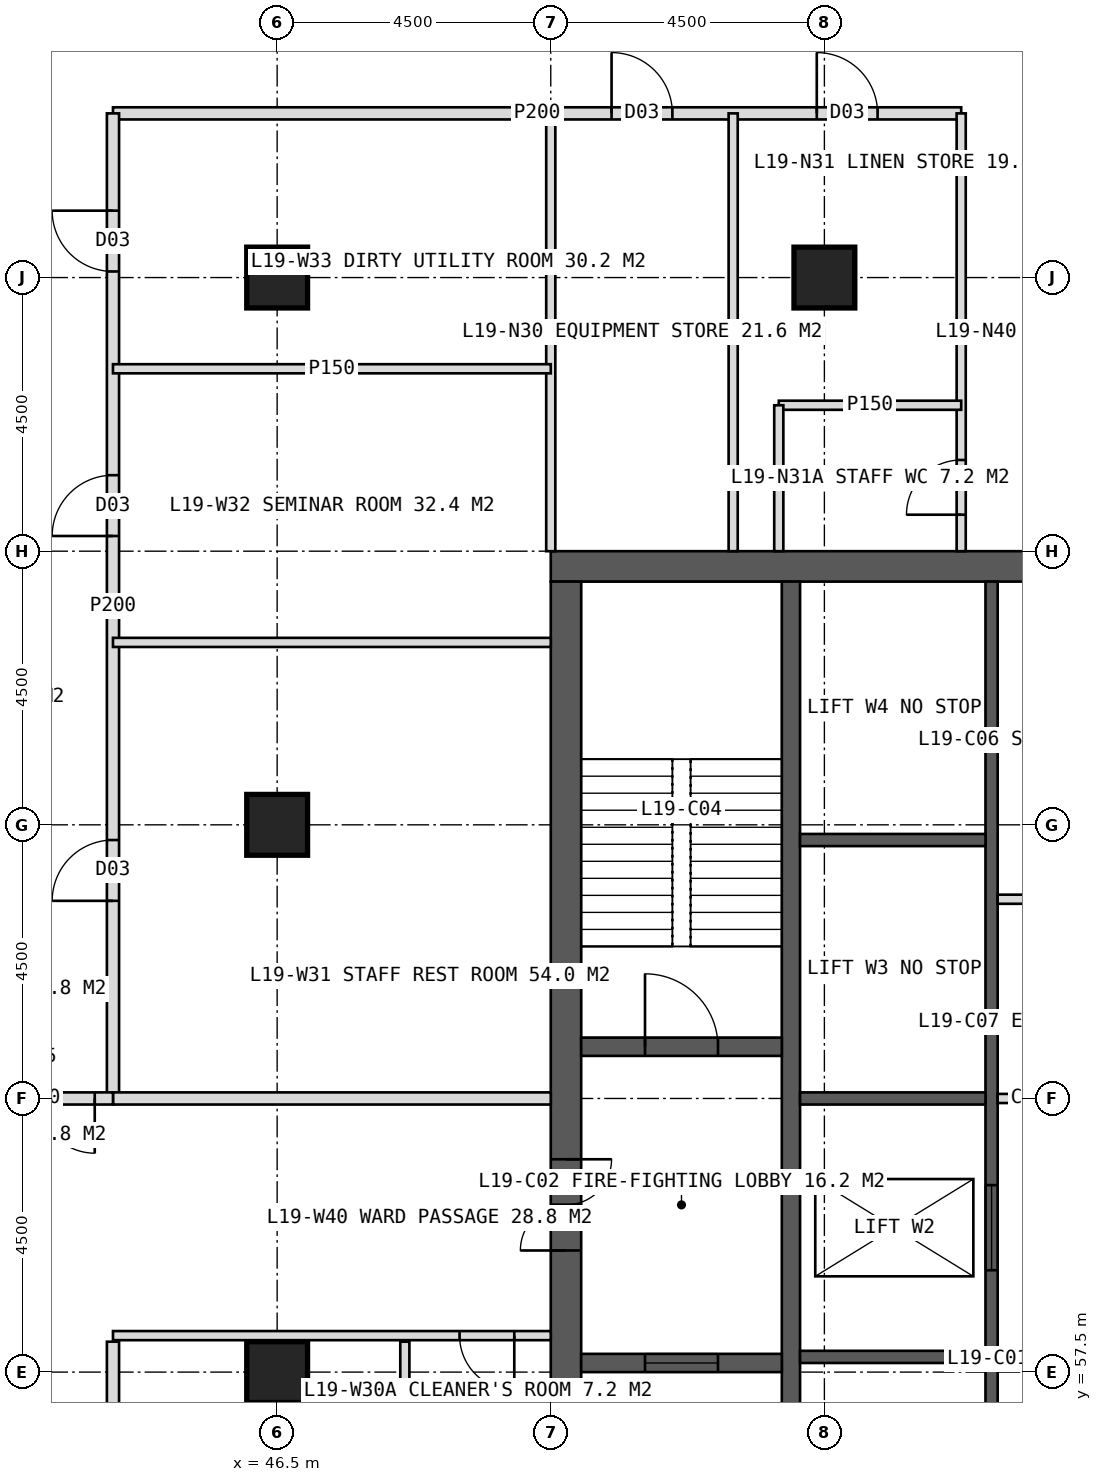
"""IFC4 building model, lengths in metres.
Left out: names, types, materials, properties, quantities, classifications, styles, units other than length and angle.
Written with IfcOpenShell. Run it as: python <this file> out.ifc"""

import sys

from ifc_helpers import new_model, si_unit, direction, frame, frame_2d, origin, origin_2d, place, context, subcontext, project, spatial, rectangle, hollow_rectangle, extrude, element, fill, save


model = new_model("IFC4")
c1 = context("Model", 3, precision=1e-05, world=origin(), true_north=direction((0.0, 1.0)))
c2 = subcontext(c1, "Body", "Model", "MODEL_VIEW")
j1 = project(units=[si_unit("LENGTHUNIT", "METRE"), si_unit("PLANEANGLEUNIT", "RADIAN")], contexts=[c1])
p1 = place(None, origin())
s1 = spatial("IfcSite", under=j1, at=p1, CompositionType="ELEMENT")
p2 = place(p1, origin())
s2 = spatial("IfcBuilding", under=s1, at=p2, CompositionType="ELEMENT")
p3 = place(p2, frame((0.0, 0.0, 83.0)))
s3 = spatial("IfcBuildingStorey", under=s2, at=p3, CompositionType="ELEMENT", Elevation=83.0)
p4 = place(p3, frame((51.0, 70.75, 0.0), z_axis=(0.0, 0.0, 1.0), x_axis=(1.0, 0.0, 0.0)))
e1 = element("IfcWall", 1, at=p4, inside=s3, PredefinedType="SHEAR", context=c2, shape_type="SweptSolid", body=[
    extrude(rectangle(XDim=18.0, YDim=0.5, at=frame_2d((9.0, 0.0))), origin(), (0.0, 0.0, 1.0), 4.0),
])
p5 = place(p4, frame((8.1, 0.0, 0.0)))
e2 = element("IfcOpeningElement", 2, at=p5, cuts=e1, PredefinedType="OPENING", context=c2, shape_type="SweptSolid", body=[
    extrude(rectangle(XDim=1.8, YDim=2.2, at=frame_2d((0.9, 1.1))), frame((0.0, 0.26, 0.0), z_axis=(0.0, -1.0, 0.0), x_axis=(1.0, 0.0, 0.0)), (0.0, 0.0, 1.0), 0.52),
])
p6 = place(p3, frame((51.25, 53.5, 0.0), z_axis=(0.0, 0.0, 1.0), x_axis=(0.0, 1.0, 0.0)))
e3 = element("IfcWall", 3, at=p6, inside=s3, PredefinedType="SHEAR", context=c2, shape_type="SweptSolid", body=[
    extrude(rectangle(XDim=17.0, YDim=0.5, at=frame_2d((8.5, 0.0))), origin(), (0.0, 0.0, 1.0), 4.0),
])
p7 = place(p6, frame((6.0, 0.0, 0.0)))
e4 = element("IfcOpeningElement", 4, at=p7, cuts=e3, PredefinedType="OPENING", context=c2, shape_type="SweptSolid", body=[
    extrude(rectangle(XDim=1.5, YDim=2.2, at=frame_2d((0.75, 1.1))), frame((0.0, 0.26, 0.0), z_axis=(0.0, -1.0, 0.0), x_axis=(1.0, 0.0, 0.0)), (0.0, 0.0, 1.0), 0.52),
])
p8 = place(p3, frame((54.95, 53.5, 0.0), z_axis=(0.0, 0.0, 1.0), x_axis=(0.0, 1.0, 0.0)))
e5 = element("IfcWall", 5, at=p8, inside=s3, PredefinedType="SHEAR", context=c2, shape_type="SweptSolid", body=[
    extrude(rectangle(XDim=17.0, YDim=0.3, at=frame_2d((8.5, 0.0))), origin(), (0.0, 0.0, 1.0), 4.0),
])
p9 = place(p3, frame((58.25, 53.5, 0.0), z_axis=(0.0, 0.0, 1.0), x_axis=(0.0, 1.0, 0.0)))
e6 = element("IfcWall", 6, at=p9, inside=s3, PredefinedType="SHEAR", context=c2, shape_type="SweptSolid", body=[
    extrude(rectangle(XDim=17.0, YDim=0.2, at=frame_2d((8.5, 0.0))), origin(), (0.0, 0.0, 1.0), 4.0),
])
p10 = place(p9, frame((1.375, 0.0, 0.0)))
e7 = element("IfcOpeningElement", 7, at=p10, cuts=e6, PredefinedType="OPENING", context=c2, shape_type="SweptSolid", body=[
    extrude(rectangle(XDim=1.4, YDim=2.2, at=frame_2d((0.7, 1.1))), frame((0.0, 0.11, 0.0), z_axis=(0.0, -1.0, 0.0), x_axis=(1.0, 0.0, 0.0)), (0.0, 0.0, 1.0), 0.22),
])
p11 = place(p9, frame((5.675, 0.0, 0.0)))
e8 = element("IfcOpeningElement", 8, at=p11, cuts=e6, PredefinedType="OPENING", context=c2, shape_type="SweptSolid", body=[
    extrude(rectangle(XDim=1.4, YDim=2.2, at=frame_2d((0.7, 1.1))), frame((0.0, 0.11, 0.0), z_axis=(0.0, -1.0, 0.0), x_axis=(1.0, 0.0, 0.0)), (0.0, 0.0, 1.0), 0.22),
])
for number, where, z_axis, x_axis in (
    (9, (55.1, 57.75, 0.0), (0.0, 0.0, 1.0), (1.0, 0.0, 0.0)),
    (10, (55.1, 62.0, 0.0), (0.0, 0.0, 1.0), (1.0, 0.0, 0.0)),
    (11, (55.1, 66.25, 0.0), (0.0, 0.0, 1.0), (1.0, 0.0, 0.0)),
):
    element("IfcWall", number, at=place(p3, frame(where, z_axis=z_axis, x_axis=x_axis)), inside=s3, PredefinedType="SHEAR", context=c2, shape_type="SweptSolid", body=[
        extrude(rectangle(XDim=3.05, YDim=0.2, at=frame_2d((1.525, 0.0))), origin(), (0.0, 0.0, 1.0), 4.0),
    ])
p12 = place(p3, frame((51.5, 62.85, 0.0), z_axis=(0.0, 0.0, 1.0), x_axis=(1.0, 0.0, 0.0)))
e12 = element("IfcWall", 12, at=p12, inside=s3, PredefinedType="SHEAR", context=c2, shape_type="SweptSolid", body=[
    extrude(rectangle(XDim=3.3, YDim=0.3, at=frame_2d((1.65, 0.0))), origin(), (0.0, 0.0, 1.0), 4.0),
])
p13 = place(p12, frame((1.05, 0.0, 0.0)))
e13 = element("IfcOpeningElement", 13, at=p13, cuts=e12, PredefinedType="OPENING", context=c2, shape_type="SweptSolid", body=[
    extrude(rectangle(XDim=1.2, YDim=2.1, at=frame_2d((0.6, 1.05))), frame((0.0, 0.16, 0.0), z_axis=(0.0, -1.0, 0.0), x_axis=(1.0, 0.0, 0.0)), (0.0, 0.0, 1.0), 0.32),
])
p14 = place(p3, frame((51.5, 57.65, 0.0), z_axis=(0.0, 0.0, 1.0), x_axis=(1.0, 0.0, 0.0)))
e14 = element("IfcWall", 14, at=p14, inside=s3, PredefinedType="SHEAR", context=c2, shape_type="SweptSolid", body=[
    extrude(rectangle(XDim=3.3, YDim=0.3, at=frame_2d((1.65, 0.0))), origin(), (0.0, 0.0, 1.0), 4.0),
])
p15 = place(p14, frame((1.05, 0.0, 0.0)))
e15 = element("IfcOpeningElement", 15, at=p15, cuts=e14, PredefinedType="OPENING", context=c2, shape_type="SweptSolid", body=[
    extrude(rectangle(XDim=1.2, YDim=2.2, at=frame_2d((0.6, 1.1))), frame((0.0, 0.16, 0.0), z_axis=(0.0, -1.0, 0.0), x_axis=(1.0, 0.0, 0.0)), (0.0, 0.0, 1.0), 0.32),
])
for number, where, z_axis, x_axis in (
    (16, (46.5, 75.5, 0.0), (0.0, 0.0, 1.0), (1.0, 0.0, 0.0)),
    (17, (55.5, 75.5, 0.0), (0.0, 0.0, 1.0), (1.0, 0.0, 0.0)),
    (18, (46.5, 57.5, 0.0), (0.0, 0.0, 1.0), (1.0, 0.0, 0.0)),
    (19, (46.5, 66.5, 0.0), (0.0, 0.0, 1.0), (1.0, 0.0, 0.0)),
):
    element("IfcColumn", number, at=place(p3, frame(where, z_axis=z_axis, x_axis=x_axis)), inside=s3, PredefinedType="COLUMN", context=c2, shape_type="SweptSolid", body=[
        extrude(hollow_rectangle(XDim=1.0, YDim=1.0, WallThickness=0.1, at=origin_2d()), origin(), (0.0, 0.0, 1.0), 4.0),
    ])
p16 = place(p3, frame((51.0, 71.0, 0.0), z_axis=(0.0, 0.0, 1.0), x_axis=(0.0, 1.0, 0.0)))
e20 = element("IfcWall", 20, at=p16, inside=s3, PredefinedType="PARTITIONING", context=c2, shape_type="SweptSolid", body=[
    extrude(rectangle(XDim=7.2, YDim=0.15, at=frame_2d((3.6, 0.0))), origin(), (0.0, 0.0, 1.0), 3.75),
])
p17 = place(p3, frame((43.8, 78.2, 0.0), z_axis=(0.0, 0.0, 1.0), x_axis=(1.0, 0.0, 0.0)))
e21 = element("IfcWall", 21, at=p17, inside=s3, PredefinedType="PARTITIONING", context=c2, shape_type="SweptSolid", body=[
    extrude(rectangle(XDim=13.95, YDim=0.2, at=frame_2d((6.975, 0.0))), origin(), (0.0, 0.0, 1.0), 3.75),
])
p18 = place(p17, frame((8.2, 0.0, 0.0)))
e22 = element("IfcOpeningElement", 22, at=p18, cuts=e21, PredefinedType="OPENING", context=c2, shape_type="SweptSolid", body=[
    extrude(rectangle(XDim=1.0, YDim=2.1, at=frame_2d((0.5, 1.05))), frame((0.0, 0.11, 0.0), z_axis=(0.0, -1.0, 0.0), x_axis=(1.0, 0.0, 0.0)), (0.0, 0.0, 1.0), 0.22),
])
p19 = place(p17, frame((11.575, 0.0, 0.0)))
e23 = element("IfcOpeningElement", 23, at=p19, cuts=e21, PredefinedType="OPENING", context=c2, shape_type="SweptSolid", body=[
    extrude(rectangle(XDim=1.0, YDim=2.1, at=frame_2d((0.5, 1.05))), frame((0.0, 0.11, 0.0), z_axis=(0.0, -1.0, 0.0), x_axis=(1.0, 0.0, 0.0)), (0.0, 0.0, 1.0), 0.22),
])
p20 = place(p3, frame((57.75, 71.0, 0.0), z_axis=(0.0, 0.0, 1.0), x_axis=(0.0, 1.0, 0.0)))
e24 = element("IfcWall", 24, at=p20, inside=s3, PredefinedType="PARTITIONING", context=c2, shape_type="SweptSolid", body=[
    extrude(rectangle(XDim=7.2, YDim=0.15, at=frame_2d((3.6, 0.0))), origin(), (0.0, 0.0, 1.0), 3.75),
])
p21 = place(p20, frame((0.6, 0.0, 0.0)))
e25 = element("IfcOpeningElement", 25, at=p21, cuts=e24, PredefinedType="OPENING", context=c2, shape_type="SweptSolid", body=[
    extrude(rectangle(XDim=0.9, YDim=2.1, at=frame_2d((0.45, 1.05))), frame((0.0, 0.085, 0.0), z_axis=(0.0, -1.0, 0.0), x_axis=(1.0, 0.0, 0.0)), (0.0, 0.0, 1.0), 0.17),
])
p22 = place(p3, frame((54.0, 71.0, 0.0), z_axis=(0.0, 0.0, 1.0), x_axis=(0.0, 1.0, 0.0)))
e26 = element("IfcWall", 26, at=p22, inside=s3, PredefinedType="PARTITIONING", context=c2, shape_type="SweptSolid", body=[
    extrude(rectangle(XDim=7.2, YDim=0.15, at=frame_2d((3.6, 0.0))), origin(), (0.0, 0.0, 1.0), 3.75),
])
p23 = place(p3, frame((54.75, 73.4, 0.0), z_axis=(0.0, 0.0, 1.0), x_axis=(1.0, 0.0, 0.0)))
e27 = element("IfcWall", 27, at=p23, inside=s3, PredefinedType="PARTITIONING", context=c2, shape_type="SweptSolid", body=[
    extrude(rectangle(XDim=3.0, YDim=0.15, at=frame_2d((1.5, 0.0))), origin(), (0.0, 0.0, 1.0), 3.75),
])
p24 = place(p3, frame((54.75, 71.0, 0.0), z_axis=(0.0, 0.0, 1.0), x_axis=(0.0, 1.0, 0.0)))
e28 = element("IfcWall", 28, at=p24, inside=s3, PredefinedType="PARTITIONING", context=c2, shape_type="SweptSolid", body=[
    extrude(rectangle(XDim=2.4, YDim=0.15, at=frame_2d((1.2, 0.0))), origin(), (0.0, 0.0, 1.0), 3.75),
])
p25 = place(p3, frame((43.8, 45.8, 0.0), z_axis=(0.0, 0.0, 1.0), x_axis=(0.0, 1.0, 0.0)))
e29 = element("IfcWall", 29, at=p25, inside=s3, PredefinedType="PARTITIONING", context=c2, shape_type="SweptSolid", body=[
    extrude(rectangle(XDim=12.2, YDim=0.2, at=frame_2d((6.1, 0.0))), origin(), (0.0, 0.0, 1.0), 3.75),
])
p26 = place(p25, frame((9.2, 0.0, 0.0)))
e30 = element("IfcOpeningElement", 30, at=p26, cuts=e29, PredefinedType="OPENING", context=c2, shape_type="SweptSolid", body=[
    extrude(rectangle(XDim=1.0, YDim=2.1, at=frame_2d((0.5, 1.05))), frame((0.0, 0.11, 0.0), z_axis=(0.0, -1.0, 0.0), x_axis=(1.0, 0.0, 0.0)), (0.0, 0.0, 1.0), 0.22),
])
p27 = place(p3, frame((43.8, 62.0, 0.0), z_axis=(0.0, 0.0, 1.0), x_axis=(0.0, 1.0, 0.0)))
e31 = element("IfcWall", 31, at=p27, inside=s3, PredefinedType="PARTITIONING", context=c2, shape_type="SweptSolid", body=[
    extrude(rectangle(XDim=16.2, YDim=0.2, at=frame_2d((8.1, 0.0))), origin(), (0.0, 0.0, 1.0), 3.75),
])
p28 = place(p27, frame((3.25, 0.0, 0.0)))
e32 = element("IfcOpeningElement", 32, at=p28, cuts=e31, PredefinedType="OPENING", context=c2, shape_type="SweptSolid", body=[
    extrude(rectangle(XDim=1.0, YDim=2.1, at=frame_2d((0.5, 1.05))), frame((0.0, 0.11, 0.0), z_axis=(0.0, -1.0, 0.0), x_axis=(1.0, 0.0, 0.0)), (0.0, 0.0, 1.0), 0.22),
])
p29 = place(p27, frame((9.25, 0.0, 0.0)))
e33 = element("IfcOpeningElement", 33, at=p29, cuts=e31, PredefinedType="OPENING", context=c2, shape_type="SweptSolid", body=[
    extrude(rectangle(XDim=1.0, YDim=2.1, at=frame_2d((0.5, 1.05))), frame((0.0, 0.11, 0.0), z_axis=(0.0, -1.0, 0.0), x_axis=(1.0, 0.0, 0.0)), (0.0, 0.0, 1.0), 0.22),
])
p30 = place(p27, frame((13.6, 0.0, 0.0)))
e34 = element("IfcOpeningElement", 34, at=p30, cuts=e31, PredefinedType="OPENING", context=c2, shape_type="SweptSolid", body=[
    extrude(rectangle(XDim=1.0, YDim=2.1, at=frame_2d((0.5, 1.05))), frame((0.0, 0.11, 0.0), z_axis=(0.0, -1.0, 0.0), x_axis=(1.0, 0.0, 0.0)), (0.0, 0.0, 1.0), 0.22),
])
p31 = place(p3, frame((51.0, 58.1, 0.0), z_axis=(0.0, 0.0, 1.0), x_axis=(-1.0, 0.0, 0.0)))
e35 = element("IfcWall", 35, at=p31, inside=s3, PredefinedType="PARTITIONING", context=c2, shape_type="SweptSolid", body=[
    extrude(rectangle(XDim=7.2, YDim=0.15, at=frame_2d((3.6, 0.0))), origin(), (0.0, 0.0, 1.0), 3.75),
])
p32 = place(p31, frame((0.6, 0.0, 0.0)))
e36 = element("IfcOpeningElement", 36, at=p32, cuts=e35, PredefinedType="OPENING", context=c2, shape_type="SweptSolid", body=[
    extrude(rectangle(XDim=0.9, YDim=2.1, at=frame_2d((0.45, 1.05))), frame((0.0, 0.085, 0.0), z_axis=(0.0, -1.0, 0.0), x_axis=(1.0, 0.0, 0.0)), (0.0, 0.0, 1.0), 0.17),
])
p33 = place(p3, frame((51.0, 62.0, 0.0), z_axis=(0.0, 0.0, 1.0), x_axis=(-1.0, 0.0, 0.0)))
e37 = element("IfcWall", 37, at=p33, inside=s3, PredefinedType="SOLIDWALL", context=c2, shape_type="SweptSolid", body=[
    extrude(rectangle(XDim=7.2, YDim=0.2, at=frame_2d((3.6, 0.0))), origin(), (0.0, 0.0, 1.0), 2.75),
])
for number, where, z_axis, x_axis in (
    (38, (51.0, 69.5, 0.0), (0.0, 0.0, 1.0), (-1.0, 0.0, 0.0)),
    (39, (51.0, 74.0, 0.0), (0.0, 0.0, 1.0), (-1.0, 0.0, 0.0)),
):
    element("IfcWall", number, at=place(p3, frame(where, z_axis=z_axis, x_axis=x_axis)), inside=s3, PredefinedType="PARTITIONING", context=c2, shape_type="SweptSolid", body=[
        extrude(rectangle(XDim=7.2, YDim=0.15, at=frame_2d((3.6, 0.0))), origin(), (0.0, 0.0, 1.0), 3.75),
    ])
p34 = place(p3, frame((48.6, 55.0, 0.0), z_axis=(0.0, 0.0, 1.0), x_axis=(0.0, 1.0, 0.0)))
e40 = element("IfcWall", 40, at=p34, inside=s3, PredefinedType="PARTITIONING", context=c2, shape_type="SweptSolid", body=[
    extrude(rectangle(XDim=3.0, YDim=0.15, at=frame_2d((1.5, 0.0))), origin(), (0.0, 0.0, 1.0), 3.75),
])
p35 = place(p3, frame((43.8, 62.0, 0.0), z_axis=(0.0, 0.0, 1.0), x_axis=(-1.0, 0.0, 0.0)))
e41 = element("IfcWall", 41, at=p35, inside=s3, PredefinedType="SOLIDWALL", context=c2, shape_type="SweptSolid", body=[
    extrude(rectangle(XDim=2.7, YDim=0.2, at=frame_2d((1.35, 0.0))), origin(), (0.0, 0.0, 1.0), 2.75),
])
p36 = place(p35, frame((0.3, 0.0, 0.0)))
e42 = element("IfcOpeningElement", 42, at=p36, cuts=e41, PredefinedType="OPENING", context=c2, shape_type="SweptSolid", body=[
    extrude(rectangle(XDim=1.8, YDim=2.2, at=frame_2d((0.9, 1.1))), frame((0.0, 0.11, 0.0), z_axis=(0.0, -1.0, 0.0), x_axis=(1.0, 0.0, 0.0)), (0.0, 0.0, 1.0), 0.22),
])
p37 = place(p3, frame((58.35, 62.0, 0.0), z_axis=(0.0, 0.0, 1.0), x_axis=(1.0, 0.0, 0.0)))
e43 = element("IfcWall", 43, at=p37, inside=s3, PredefinedType="PARTITIONING", context=c2, shape_type="SweptSolid", body=[
    extrude(rectangle(XDim=3.3, YDim=0.15, at=frame_2d((1.65, 0.0))), origin(), (0.0, 0.0, 1.0), 3.75),
])
p38 = place(p37, frame((1.15, 0.0, 0.0)))
e44 = element("IfcOpeningElement", 44, at=p38, cuts=e43, PredefinedType="OPENING", context=c2, shape_type="SweptSolid", body=[
    extrude(rectangle(XDim=1.0, YDim=2.1, at=frame_2d((0.5, 1.05))), frame((0.0, 0.085, 0.0), z_axis=(0.0, -1.0, 0.0), x_axis=(1.0, 0.0, 0.0)), (0.0, 0.0, 1.0), 0.17),
])
p39 = place(p3, frame((58.35, 65.277, 0.0), z_axis=(0.0, 0.0, 1.0), x_axis=(1.0, 0.0, 0.0)))
e45 = element("IfcWall", 45, at=p39, inside=s3, PredefinedType="PARTITIONING", context=c2, shape_type="SweptSolid", body=[
    extrude(rectangle(XDim=3.3, YDim=0.15, at=frame_2d((1.65, 0.0))), origin(), (0.0, 0.0, 1.0), 3.75),
])
p40 = place(p18, origin())
e46 = element("IfcDoor", 46, at=p40, inside=s3, OperationType="SINGLE_SWING_LEFT", PredefinedType="DOOR", context=c2, shape_type="SweptSolid", body=[
    extrude(rectangle(XDim=1.0, YDim=2.1, at=frame_2d((0.5, 1.05))), frame((0.0, 0.025, 0.0), z_axis=(0.0, -1.0, 0.0), x_axis=(1.0, 0.0, 0.0)), (0.0, 0.0, 1.0), 0.05),
])
fill(e22, e46)
p41 = place(p21, origin())
e47 = element("IfcDoor", 47, at=p41, inside=s3, OperationType="SINGLE_SWING_LEFT", PredefinedType="DOOR", context=c2, shape_type="SweptSolid", body=[
    extrude(rectangle(XDim=0.9, YDim=2.1, at=frame_2d((0.45, 1.05))), frame((0.0, 0.025, 0.0), z_axis=(0.0, -1.0, 0.0), x_axis=(1.0, 0.0, 0.0)), (0.0, 0.0, 1.0), 0.05),
])
fill(e25, e47)
p42 = place(p19, origin())
e48 = element("IfcDoor", 48, at=p42, inside=s3, OperationType="SINGLE_SWING_LEFT", PredefinedType="DOOR", context=c2, shape_type="SweptSolid", body=[
    extrude(rectangle(XDim=1.0, YDim=2.1, at=frame_2d((0.5, 1.05))), frame((0.0, 0.025, 0.0), z_axis=(0.0, -1.0, 0.0), x_axis=(1.0, 0.0, 0.0)), (0.0, 0.0, 1.0), 0.05),
])
fill(e23, e48)
p43 = place(p32, origin())
e49 = element("IfcDoor", 49, at=p43, inside=s3, OperationType="SINGLE_SWING_LEFT", PredefinedType="DOOR", context=c2, shape_type="SweptSolid", body=[
    extrude(rectangle(XDim=0.9, YDim=2.1, at=frame_2d((0.45, 1.05))), frame((0.0, 0.025, 0.0), z_axis=(0.0, -1.0, 0.0), x_axis=(1.0, 0.0, 0.0)), (0.0, 0.0, 1.0), 0.05),
])
fill(e36, e49)
p44 = place(p28, origin())
e50 = element("IfcDoor", 50, at=p44, inside=s3, OperationType="SINGLE_SWING_LEFT", PredefinedType="DOOR", context=c2, shape_type="SweptSolid", body=[
    extrude(rectangle(XDim=1.0, YDim=2.1, at=frame_2d((0.5, 1.05))), frame((0.0, 0.025, 0.0), z_axis=(0.0, -1.0, 0.0), x_axis=(1.0, 0.0, 0.0)), (0.0, 0.0, 1.0), 0.05),
])
fill(e32, e50)
p45 = place(p29, origin())
e51 = element("IfcDoor", 51, at=p45, inside=s3, OperationType="SINGLE_SWING_LEFT", PredefinedType="DOOR", context=c2, shape_type="SweptSolid", body=[
    extrude(rectangle(XDim=1.0, YDim=2.1, at=frame_2d((0.5, 1.05))), frame((0.0, 0.025, 0.0), z_axis=(0.0, -1.0, 0.0), x_axis=(1.0, 0.0, 0.0)), (0.0, 0.0, 1.0), 0.05),
])
fill(e33, e51)
p46 = place(p30, origin())
e52 = element("IfcDoor", 52, at=p46, inside=s3, OperationType="SINGLE_SWING_RIGHT", PredefinedType="DOOR", context=c2, shape_type="SweptSolid", body=[
    extrude(rectangle(XDim=1.0, YDim=2.1, at=frame_2d((0.5, 1.05))), frame((0.0, 0.025, 0.0), z_axis=(0.0, -1.0, 0.0), x_axis=(1.0, 0.0, 0.0)), (0.0, 0.0, 1.0), 0.05),
])
fill(e34, e52)
p47 = place(p36, origin())
e53 = element("IfcDoor", 53, at=p47, inside=s3, OperationType="DOUBLE_DOOR_DOUBLE_SWING", PredefinedType="DOOR", context=c2, shape_type="SweptSolid", body=[
    extrude(rectangle(XDim=1.8, YDim=2.2, at=frame_2d((0.9, 1.1))), frame((0.0, 0.025, 0.0), z_axis=(0.0, -1.0, 0.0), x_axis=(1.0, 0.0, 0.0)), (0.0, 0.0, 1.0), 0.05),
])
fill(e42, e53)
p48 = place(p7, origin())
e54 = element("IfcDoor", 54, at=p48, inside=s3, OperationType="DOUBLE_DOOR_SINGLE_SWING", PredefinedType="DOOR", context=c2, shape_type="SweptSolid", body=[
    extrude(rectangle(XDim=1.5, YDim=2.2, at=frame_2d((0.75, 1.1))), frame((0.0, 0.025, 0.0), z_axis=(0.0, -1.0, 0.0), x_axis=(1.0, 0.0, 0.0)), (0.0, 0.0, 1.0), 0.05),
])
fill(e4, e54)
p49 = place(p13, origin())
e55 = element("IfcDoor", 55, at=p49, inside=s3, OperationType="SINGLE_SWING_LEFT", PredefinedType="DOOR", context=c2, shape_type="SweptSolid", body=[
    extrude(rectangle(XDim=1.2, YDim=2.1, at=frame_2d((0.6, 1.05))), frame((0.0, 0.025, 0.0), z_axis=(0.0, -1.0, 0.0), x_axis=(1.0, 0.0, 0.0)), (0.0, 0.0, 1.0), 0.05),
])
fill(e13, e55)
p50 = place(p15, origin())
e56 = element("IfcDoor", 56, at=p50, inside=s3, OperationType="SLIDING_TO_LEFT", PredefinedType="DOOR", context=c2, shape_type="SweptSolid", body=[
    extrude(rectangle(XDim=1.2, YDim=2.2, at=frame_2d((0.6, 1.1))), frame((0.0, 0.025, 0.0), z_axis=(0.0, -1.0, 0.0), x_axis=(1.0, 0.0, 0.0)), (0.0, 0.0, 1.0), 0.05),
])
fill(e15, e56)
p51 = place(p11, origin())
e57 = element("IfcDoor", 57, at=p51, inside=s3, OperationType="SLIDING_TO_LEFT", PredefinedType="DOOR", context=c2, shape_type="SweptSolid", body=[
    extrude(rectangle(XDim=1.4, YDim=2.2, at=frame_2d((0.7, 1.1))), frame((0.0, 0.025, 0.0), z_axis=(0.0, -1.0, 0.0), x_axis=(1.0, 0.0, 0.0)), (0.0, 0.0, 1.0), 0.05),
])
fill(e8, e57)
save(model, sys.argv[1])
